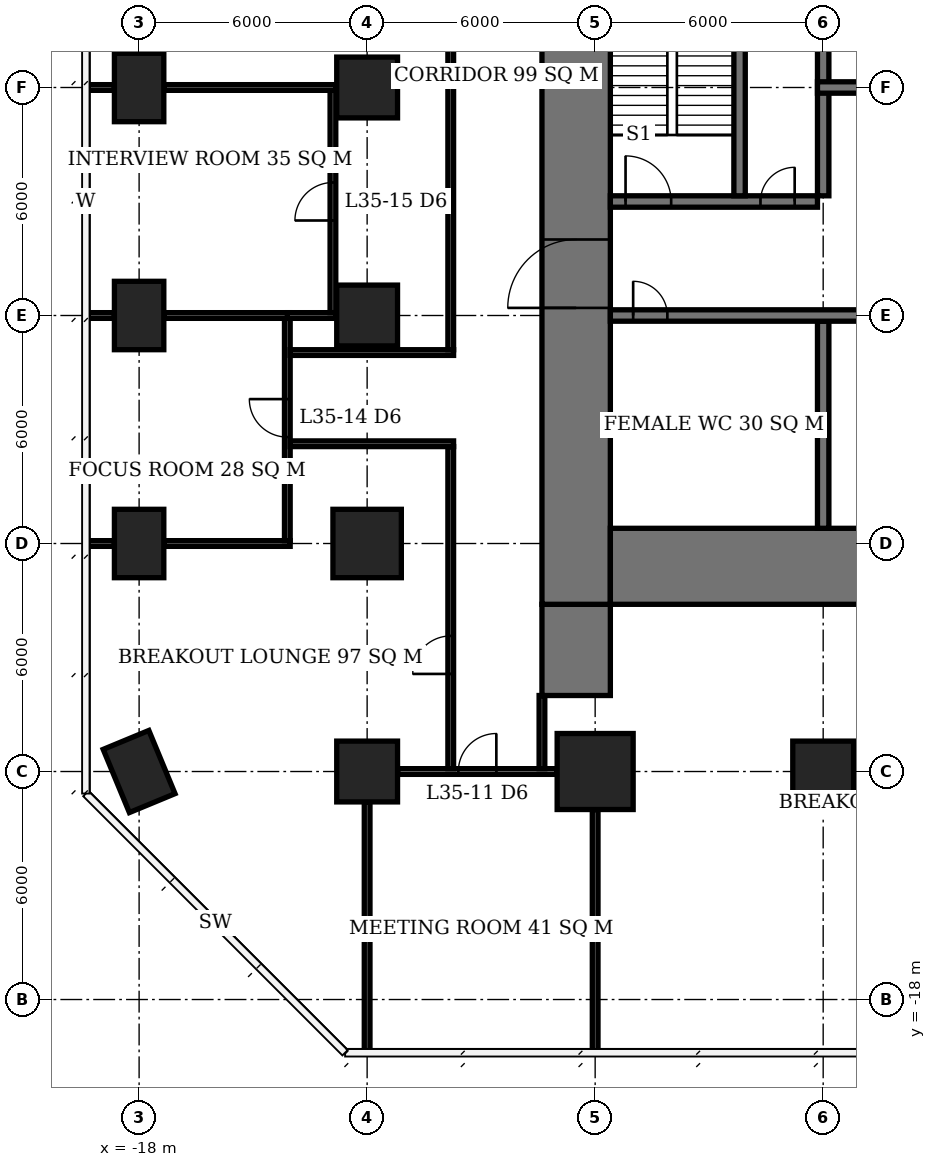
"""IFC4 building model, lengths in metres.
Left out: names, types, materials, properties, quantities, classifications, styles, units other than length and angle.
Written with IfcOpenShell. Run it as: python <this file> out.ifc"""

import sys

from ifc_helpers import new_model, si_unit, direction, frame, frame_2d, origin, origin_2d, place, context, subcontext, project, spatial, rectangle, extrude, element, fill, save


model = new_model("IFC4")
c1 = context("Model", 3, precision=1e-05, world=origin(), true_north=direction((0.0, 1.0)))
c2 = subcontext(c1, "Body", "Model", "MODEL_VIEW")
j1 = project(units=[si_unit("LENGTHUNIT", "METRE"), si_unit("PLANEANGLEUNIT", "RADIAN")], contexts=[c1])
p1 = place(None, origin())
s1 = spatial("IfcSite", under=j1, at=p1, CompositionType="ELEMENT")
p2 = place(p1, origin())
s2 = spatial("IfcBuilding", under=s1, at=p2, CompositionType="ELEMENT")
p3 = place(p2, frame((0.0, 0.0, 144.5)))
s3 = spatial("IfcBuildingStorey", under=s2, at=p3, CompositionType="ELEMENT", Elevation=144.5)
for number, where, z_axis, x_axis in (
    (1, (-18.0, -12.0, 0.0), (0.0, 0.0, 1.0), (-0.383, 0.924, 0.0)),
    (2, (-18.0, -6.0, 0.0), (0.0, 0.0, 1.0), (0.0, 1.0, 0.0)),
    (3, (-18.0, 0.0, 0.0), (0.0, 0.0, 1.0), (0.0, 1.0, 0.0)),
    (4, (-18.0, 6.0, 0.0), (0.0, 0.0, 1.0), (0.0, 1.0, 0.0)),
):
    element("IfcColumn", number, at=place(p3, frame(where, z_axis=z_axis, x_axis=x_axis)), inside=s3, PredefinedType="COLUMN", context=c2, shape_type="SweptSolid", body=[
        extrude(rectangle(XDim=1.8, YDim=1.3, at=origin_2d()), origin(), (0.0, 0.0, 1.0), 3.9),
    ])
p4 = place(p3, frame((-12.0, -12.0, 0.0), z_axis=(0.0, 0.0, 1.0), x_axis=(1.0, 0.0, 0.0)))
e5 = element("IfcColumn", 5, at=p4, inside=s3, PredefinedType="COLUMN", context=c2, shape_type="SweptSolid", body=[
    extrude(rectangle(XDim=1.6, YDim=1.6, at=origin_2d()), origin(), (0.0, 0.0, 1.0), 3.9),
])
p5 = place(p3, frame((-12.0, -6.0, 0.0), z_axis=(0.0, 0.0, 1.0), x_axis=(1.0, 0.0, 0.0)))
e6 = element("IfcColumn", 6, at=p5, inside=s3, PredefinedType="COLUMN", context=c2, shape_type="SweptSolid", body=[
    extrude(rectangle(XDim=1.8, YDim=1.8, at=origin_2d()), origin(), (0.0, 0.0, 1.0), 3.9),
])
for number, where, z_axis, x_axis in (
    (7, (-12.0, 0.0, 0.0), (0.0, 0.0, 1.0), (1.0, 0.0, 0.0)),
    (8, (-12.0, 6.0, 0.0), (0.0, 0.0, 1.0), (1.0, 0.0, 0.0)),
):
    element("IfcColumn", number, at=place(p3, frame(where, z_axis=z_axis, x_axis=x_axis)), inside=s3, PredefinedType="COLUMN", context=c2, shape_type="SweptSolid", body=[
        extrude(rectangle(XDim=1.6, YDim=1.6, at=origin_2d()), origin(), (0.0, 0.0, 1.0), 3.9),
    ])
p6 = place(p3, frame((-6.0, -12.0, 0.0), z_axis=(0.0, 0.0, 1.0), x_axis=(1.0, 0.0, 0.0)))
e9 = element("IfcColumn", 9, at=p6, inside=s3, PredefinedType="COLUMN", context=c2, shape_type="SweptSolid", body=[
    extrude(rectangle(XDim=2.0, YDim=2.0, at=origin_2d()), origin(), (0.0, 0.0, 1.0), 3.9),
])
p7 = place(p3, frame((0.0, -12.0, 0.0), z_axis=(0.0, 0.0, 1.0), x_axis=(1.0, 0.0, 0.0)))
e10 = element("IfcColumn", 10, at=p7, inside=s3, PredefinedType="COLUMN", context=c2, shape_type="SweptSolid", body=[
    extrude(rectangle(XDim=1.6, YDim=1.6, at=origin_2d()), origin(), (0.0, 0.0, 1.0), 3.9),
])
p8 = place(p3, frame((-5.6, -6.6, 0.0), z_axis=(0.0, 0.0, 1.0), x_axis=(1.0, 0.0, 0.0)))
e11 = element("IfcWall", 11, at=p8, inside=s3, PredefinedType="SHEAR", context=c2, shape_type="SweptSolid", body=[
    extrude(rectangle(XDim=23.2, YDim=2.0, at=frame_2d((11.6, 0.0))), origin(), (0.0, 0.0, 1.0), 3.9),
])
p9 = place(p3, frame((-6.5, -7.6, 0.0), z_axis=(0.0, 0.0, 1.0), x_axis=(0.0, 1.0, 0.0)))
e12 = element("IfcWall", 12, at=p9, inside=s3, PredefinedType="SHEAR", context=c2, shape_type="SweptSolid", body=[
    extrude(rectangle(XDim=21.2, YDim=1.8, at=frame_2d((10.6, 0.0))), origin(), (0.0, 0.0, 1.0), 3.9),
])
p10 = place(p9, frame((7.8, 0.0, 0.0)))
e13 = element("IfcOpeningElement", 13, at=p10, cuts=e12, PredefinedType="OPENING", context=c2, shape_type="SweptSolid", body=[
    extrude(rectangle(XDim=1.8, YDim=2.4, at=frame_2d((0.9, 1.2))), frame((0.0, 0.91, 0.0), z_axis=(0.0, -1.0, 0.0), x_axis=(1.0, 0.0, 0.0)), (0.0, 0.0, 1.0), 1.82),
])
p11 = place(p3, frame((-6.5, -10.0, 0.0), z_axis=(0.0, 0.0, 1.0), x_axis=(0.0, 1.0, 0.0)))
e14 = element("IfcWall", 14, at=p11, inside=s3, PredefinedType="SHEAR", context=c2, shape_type="SweptSolid", body=[
    extrude(rectangle(XDim=2.4, YDim=1.8, at=frame_2d((1.2, 0.0))), origin(), (0.0, 0.0, 1.0), 3.9),
])
p12 = place(p3, frame((-5.6, 0.0, 0.0), z_axis=(0.0, 0.0, 1.0), x_axis=(1.0, 0.0, 0.0)))
e15 = element("IfcWall", 15, at=p12, inside=s3, PredefinedType="SHEAR", context=c2, shape_type="SweptSolid", body=[
    extrude(rectangle(XDim=17.75, YDim=0.3, at=frame_2d((8.875, 0.0))), origin(), (0.0, 0.0, 1.0), 3.9),
])
p13 = place(p12, frame((0.6, 0.0, 0.0)))
e16 = element("IfcOpeningElement", 16, at=p13, cuts=e15, PredefinedType="OPENING", context=c2, shape_type="SweptSolid", body=[
    extrude(rectangle(XDim=0.9, YDim=2.1, at=frame_2d((0.45, 1.05))), frame((0.0, 0.16, 0.0), z_axis=(0.0, -1.0, 0.0), x_axis=(1.0, 0.0, 0.0)), (0.0, 0.0, 1.0), 0.32),
])
p14 = place(p12, frame((6.55, 0.0, 0.0)))
e17 = element("IfcOpeningElement", 17, at=p14, cuts=e15, PredefinedType="OPENING", context=c2, shape_type="SweptSolid", body=[
    extrude(rectangle(XDim=1.1, YDim=2.1, at=frame_2d((0.55, 1.05))), frame((0.0, 0.16, 0.0), z_axis=(0.0, -1.0, 0.0), x_axis=(1.0, 0.0, 0.0)), (0.0, 0.0, 1.0), 0.32),
])
p15 = place(p12, frame((9.55, 0.0, 0.0)))
e18 = element("IfcOpeningElement", 18, at=p15, cuts=e15, PredefinedType="OPENING", context=c2, shape_type="SweptSolid", body=[
    extrude(rectangle(XDim=1.1, YDim=2.1, at=frame_2d((0.55, 1.05))), frame((0.0, 0.16, 0.0), z_axis=(0.0, -1.0, 0.0), x_axis=(1.0, 0.0, 0.0)), (0.0, 0.0, 1.0), 0.32),
])
p16 = place(p3, frame((-5.6, 3.0, 0.0), z_axis=(0.0, 0.0, 1.0), x_axis=(1.0, 0.0, 0.0)))
e19 = element("IfcWall", 19, at=p16, inside=s3, PredefinedType="SHEAR", context=c2, shape_type="SweptSolid", body=[
    extrude(rectangle(XDim=5.45, YDim=0.3, at=frame_2d((2.725, 0.0))), origin(), (0.0, 0.0, 1.0), 3.9),
])
p17 = place(p16, frame((0.4, 0.0, 0.0)))
e20 = element("IfcOpeningElement", 20, at=p17, cuts=e19, PredefinedType="OPENING", context=c2, shape_type="SweptSolid", body=[
    extrude(rectangle(XDim=1.2, YDim=2.1, at=frame_2d((0.6, 1.05))), frame((0.0, 0.16, 0.0), z_axis=(0.0, -1.0, 0.0), x_axis=(1.0, 0.0, 0.0)), (0.0, 0.0, 1.0), 0.32),
])
p18 = place(p16, frame((3.95, 0.0, 0.0)))
e21 = element("IfcOpeningElement", 21, at=p18, cuts=e19, PredefinedType="OPENING", context=c2, shape_type="SweptSolid", body=[
    extrude(rectangle(XDim=0.9, YDim=2.1, at=frame_2d((0.45, 1.05))), frame((0.0, 0.16, 0.0), z_axis=(0.0, -1.0, 0.0), x_axis=(1.0, 0.0, 0.0)), (0.0, 0.0, 1.0), 0.32),
])
p19 = place(p3, frame((-0.15, 6.0, 0.0), z_axis=(0.0, 0.0, 1.0), x_axis=(1.0, 0.0, 0.0)))
e22 = element("IfcWall", 22, at=p19, inside=s3, PredefinedType="SHEAR", context=c2, shape_type="SweptSolid", body=[
    extrude(rectangle(XDim=17.75, YDim=0.3, at=frame_2d((8.875, 0.0))), origin(), (0.0, 0.0, 1.0), 3.9),
])
p20 = place(p19, frame((13.15, 0.0, 0.0)))
e23 = element("IfcOpeningElement", 23, at=p20, cuts=e22, PredefinedType="OPENING", context=c2, shape_type="SweptSolid", body=[
    extrude(rectangle(XDim=0.9, YDim=2.1, at=frame_2d((0.45, 1.05))), frame((0.0, 0.16, 0.0), z_axis=(0.0, -1.0, 0.0), x_axis=(1.0, 0.0, 0.0)), (0.0, 0.0, 1.0), 0.32),
])
p21 = place(p19, frame((16.25, 0.0, 0.0)))
e24 = element("IfcOpeningElement", 24, at=p21, cuts=e22, PredefinedType="OPENING", context=c2, shape_type="SweptSolid", body=[
    extrude(rectangle(XDim=1.0, YDim=2.1, at=frame_2d((0.5, 1.05))), frame((0.0, 0.16, 0.0), z_axis=(0.0, -1.0, 0.0), x_axis=(1.0, 0.0, 0.0)), (0.0, 0.0, 1.0), 0.32),
])
p22 = place(p19, frame((7.25, 0.0, 0.0)))
e25 = element("IfcOpeningElement", 25, at=p22, cuts=e22, PredefinedType="OPENING", context=c2, shape_type="SweptSolid", body=[
    extrude(rectangle(XDim=1.0, YDim=2.1, at=frame_2d((0.5, 1.05))), frame((0.0, 0.16, 0.0), z_axis=(0.0, -1.0, 0.0), x_axis=(1.0, 0.0, 0.0)), (0.0, 0.0, 1.0), 0.32),
])
p23 = place(p19, frame((1.1, 0.0, 0.0)))
e26 = element("IfcOpeningElement", 26, at=p23, cuts=e22, PredefinedType="OPENING", context=c2, shape_type="SweptSolid", body=[
    extrude(rectangle(XDim=1.1, YDim=2.1, at=frame_2d((0.55, 1.05))), frame((0.0, 0.16, 0.0), z_axis=(0.0, -1.0, 0.0), x_axis=(1.0, 0.0, 0.0)), (0.0, 0.0, 1.0), 0.32),
])
p24 = place(p19, frame((4.1, 0.0, 0.0)))
e27 = element("IfcOpeningElement", 27, at=p24, cuts=e22, PredefinedType="OPENING", context=c2, shape_type="SweptSolid", body=[
    extrude(rectangle(XDim=1.1, YDim=2.1, at=frame_2d((0.55, 1.05))), frame((0.0, 0.16, 0.0), z_axis=(0.0, -1.0, 0.0), x_axis=(1.0, 0.0, 0.0)), (0.0, 0.0, 1.0), 0.32),
])
p25 = place(p3, frame((0.0, -5.6, 0.0), z_axis=(0.0, 0.0, 1.0), x_axis=(0.0, 1.0, 0.0)))
e28 = element("IfcWall", 28, at=p25, inside=s3, PredefinedType="SHEAR", context=c2, shape_type="SweptSolid", body=[
    extrude(rectangle(XDim=5.45, YDim=0.3, at=frame_2d((2.725, 0.0))), origin(), (0.0, 0.0, 1.0), 3.9),
])
for number, where, z_axis, x_axis in (
    (29, (0.0, 3.15, 0.0), (0.0, 0.0, 1.0), (0.0, 1.0, 0.0)),
    (30, (-2.2, 3.15, 0.0), (0.0, 0.0, 1.0), (0.0, 1.0, 0.0)),
):
    element("IfcWall", number, at=place(p3, frame(where, z_axis=z_axis, x_axis=x_axis)), inside=s3, PredefinedType="SHEAR", context=c2, shape_type="SweptSolid", body=[
        extrude(rectangle(XDim=8.45, YDim=0.3, at=frame_2d((4.225, 0.0))), origin(), (0.0, 0.0, 1.0), 3.9),
    ])
p26 = place(p3, frame((-11.2, -12.0, 0.0), z_axis=(0.0, 0.0, 1.0), x_axis=(1.0, 0.0, 0.0)))
e31 = element("IfcWall", 31, at=p26, inside=s3, PredefinedType="PARTITIONING", context=c2, shape_type="SweptSolid", body=[
    extrude(rectangle(XDim=4.2, YDim=0.15, at=frame_2d((2.1, 0.0))), origin(), (0.0, 0.0, 1.0), 3.65),
])
p27 = place(p26, frame((1.6, 0.0, 0.0)))
e32 = element("IfcOpeningElement", 32, at=p27, cuts=e31, PredefinedType="OPENING", context=c2, shape_type="SweptSolid", body=[
    extrude(rectangle(XDim=1.0, YDim=2.1, at=frame_2d((0.5, 1.05))), frame((0.0, 0.085, 0.0), z_axis=(0.0, -1.0, 0.0), x_axis=(1.0, 0.0, 0.0)), (0.0, 0.0, 1.0), 0.17),
])
p28 = place(p3, frame((-19.4, -6.0, 0.0), z_axis=(0.0, 0.0, 1.0), x_axis=(1.0, 0.0, 0.0)))
e33 = element("IfcWall", 33, at=p28, inside=s3, PredefinedType="PARTITIONING", context=c2, shape_type="SweptSolid", body=[
    extrude(rectangle(XDim=0.75, YDim=0.15, at=frame_2d((0.375, 0.0))), origin(), (0.0, 0.0, 1.0), 3.65),
])
p29 = place(p3, frame((-17.35, -6.0, 0.0), z_axis=(0.0, 0.0, 1.0), x_axis=(1.0, 0.0, 0.0)))
e34 = element("IfcWall", 34, at=p29, inside=s3, PredefinedType="PARTITIONING", context=c2, shape_type="SweptSolid", body=[
    extrude(rectangle(XDim=3.325, YDim=0.15, at=frame_2d((1.663, 0.0))), origin(), (0.0, 0.0, 1.0), 3.65),
])
p30 = place(p3, frame((-19.35, 0.0, 0.0), z_axis=(0.0, 0.0, 1.0), x_axis=(1.0, 0.0, 0.0)))
e35 = element("IfcWall", 35, at=p30, inside=s3, PredefinedType="PARTITIONING", context=c2, shape_type="SweptSolid", body=[
    extrude(rectangle(XDim=0.7, YDim=0.15, at=frame_2d((0.35, 0.0))), origin(), (0.0, 0.0, 1.0), 3.65),
])
p31 = place(p3, frame((-17.35, 0.0, 0.0), z_axis=(0.0, 0.0, 1.0), x_axis=(1.0, 0.0, 0.0)))
e36 = element("IfcWall", 36, at=p31, inside=s3, PredefinedType="PARTITIONING", context=c2, shape_type="SweptSolid", body=[
    extrude(rectangle(XDim=3.325, YDim=0.15, at=frame_2d((1.663, 0.0))), origin(), (0.0, 0.0, 1.0), 3.65),
])
p32 = place(p3, frame((-14.1, 0.0, 0.0), z_axis=(0.0, 0.0, 1.0), x_axis=(1.0, 0.0, 0.0)))
e37 = element("IfcWall", 37, at=p32, inside=s3, PredefinedType="PARTITIONING", context=c2, shape_type="SweptSolid", body=[
    extrude(rectangle(XDim=1.275, YDim=0.15, at=frame_2d((0.638, 0.0))), origin(), (0.0, 0.0, 1.0), 3.65),
])
p33 = place(p3, frame((-19.35, 6.0, 0.0), z_axis=(0.0, 0.0, 1.0), x_axis=(1.0, 0.0, 0.0)))
e38 = element("IfcWall", 38, at=p33, inside=s3, PredefinedType="PARTITIONING", context=c2, shape_type="SweptSolid", body=[
    extrude(rectangle(XDim=0.7, YDim=0.15, at=frame_2d((0.35, 0.0))), origin(), (0.0, 0.0, 1.0), 3.65),
])
p34 = place(p3, frame((-17.35, 6.0, 0.0), z_axis=(0.0, 0.0, 1.0), x_axis=(1.0, 0.0, 0.0)))
e39 = element("IfcWall", 39, at=p34, inside=s3, PredefinedType="PARTITIONING", context=c2, shape_type="SweptSolid", body=[
    extrude(rectangle(XDim=4.525, YDim=0.15, at=frame_2d((2.263, 0.0))), origin(), (0.0, 0.0, 1.0), 3.65),
])
p35 = place(p3, frame((-14.1, -5.925, 0.0), z_axis=(0.0, 0.0, 1.0), x_axis=(0.0, 1.0, 0.0)))
e40 = element("IfcWall", 40, at=p35, inside=s3, PredefinedType="PARTITIONING", context=c2, shape_type="SweptSolid", body=[
    extrude(rectangle(XDim=5.85, YDim=0.15, at=frame_2d((2.925, 0.0))), origin(), (0.0, 0.0, 1.0), 3.65),
])
p36 = place(p35, frame((2.725, 0.0, 0.0)))
e41 = element("IfcOpeningElement", 41, at=p36, cuts=e40, PredefinedType="OPENING", context=c2, shape_type="SweptSolid", body=[
    extrude(rectangle(XDim=1.0, YDim=2.1, at=frame_2d((0.5, 1.05))), frame((0.0, 0.085, 0.0), z_axis=(0.0, -1.0, 0.0), x_axis=(1.0, 0.0, 0.0)), (0.0, 0.0, 1.0), 0.17),
])
p37 = place(p3, frame((-12.9, 0.075, 0.0), z_axis=(0.0, 0.0, 1.0), x_axis=(0.0, 1.0, 0.0)))
e42 = element("IfcWall", 42, at=p37, inside=s3, PredefinedType="PARTITIONING", context=c2, shape_type="SweptSolid", body=[
    extrude(rectangle(XDim=5.85, YDim=0.15, at=frame_2d((2.925, 0.0))), origin(), (0.0, 0.0, 1.0), 3.65),
])
p38 = place(p37, frame((2.425, 0.0, 0.0)))
e43 = element("IfcOpeningElement", 43, at=p38, cuts=e42, PredefinedType="OPENING", context=c2, shape_type="SweptSolid", body=[
    extrude(rectangle(XDim=1.0, YDim=2.1, at=frame_2d((0.5, 1.05))), frame((0.0, 0.085, 0.0), z_axis=(0.0, -1.0, 0.0), x_axis=(1.0, 0.0, 0.0)), (0.0, 0.0, 1.0), 0.17),
])
p39 = place(p3, frame((-12.0, -19.4, 0.0), z_axis=(0.0, 0.0, 1.0), x_axis=(0.0, 1.0, 0.0)))
e44 = element("IfcWall", 44, at=p39, inside=s3, PredefinedType="PARTITIONING", context=c2, shape_type="SweptSolid", body=[
    extrude(rectangle(XDim=3.09, YDim=0.15, at=frame_2d((1.545, 0.0))), origin(), (0.0, 0.0, 1.0), 3.65),
])
p40 = place(p3, frame((-12.0, -16.31, 0.0), z_axis=(0.0, 0.0, 1.0), x_axis=(0.0, 1.0, 0.0)))
e45 = element("IfcWall", 45, at=p40, inside=s3, PredefinedType="PARTITIONING", context=c2, shape_type="SweptSolid", body=[
    extrude(rectangle(XDim=3.51, YDim=0.15, at=frame_2d((1.755, 0.0))), origin(), (0.0, 0.0, 1.0), 2.65),
])
p41 = place(p3, frame((-6.0, -19.4, 0.0), z_axis=(0.0, 0.0, 1.0), x_axis=(0.0, 1.0, 0.0)))
e46 = element("IfcWall", 46, at=p41, inside=s3, PredefinedType="PARTITIONING", context=c2, shape_type="SweptSolid", body=[
    extrude(rectangle(XDim=3.09, YDim=0.15, at=frame_2d((1.545, 0.0))), origin(), (0.0, 0.0, 1.0), 3.65),
])
p42 = place(p3, frame((-6.0, -16.31, 0.0), z_axis=(0.0, 0.0, 1.0), x_axis=(0.0, 1.0, 0.0)))
e47 = element("IfcWall", 47, at=p42, inside=s3, PredefinedType="PARTITIONING", context=c2, shape_type="SweptSolid", body=[
    extrude(rectangle(XDim=3.31, YDim=0.15, at=frame_2d((1.655, 0.0))), origin(), (0.0, 0.0, 1.0), 2.65),
])
for number, where, z_axis, x_axis in (
    (48, (-14.025, -3.375, 0.0), (0.0, 0.0, 1.0), (1.0, 0.0, 0.0)),
    (49, (-14.025, -0.975, 0.0), (0.0, 0.0, 1.0), (1.0, 0.0, 0.0)),
):
    element("IfcWall", number, at=place(p3, frame(where, z_axis=z_axis, x_axis=x_axis)), inside=s3, PredefinedType="PARTITIONING", context=c2, shape_type="SweptSolid", body=[
        extrude(rectangle(XDim=4.3, YDim=0.15, at=frame_2d((2.15, 0.0))), origin(), (0.0, 0.0, 1.0), 3.65),
    ])
p43 = place(p3, frame((-9.8, -11.925, 0.0), z_axis=(0.0, 0.0, 1.0), x_axis=(0.0, 1.0, 0.0)))
e50 = element("IfcWall", 50, at=p43, inside=s3, PredefinedType="PARTITIONING", context=c2, shape_type="SweptSolid", body=[
    extrude(rectangle(XDim=8.475, YDim=0.15, at=frame_2d((4.238, 0.0))), origin(), (0.0, 0.0, 1.0), 3.65),
])
p44 = place(p43, frame((2.493, 0.0, 0.0)))
e51 = element("IfcOpeningElement", 51, at=p44, cuts=e50, PredefinedType="OPENING", context=c2, shape_type="SweptSolid", body=[
    extrude(rectangle(XDim=1.0, YDim=2.1, at=frame_2d((0.5, 1.05))), frame((0.0, 0.085, 0.0), z_axis=(0.0, -1.0, 0.0), x_axis=(1.0, 0.0, 0.0)), (0.0, 0.0, 1.0), 0.17),
])
p45 = place(p3, frame((-9.8, -0.9, 0.0), z_axis=(0.0, 0.0, 1.0), x_axis=(0.0, 1.0, 0.0)))
e52 = element("IfcWall", 52, at=p45, inside=s3, PredefinedType="PARTITIONING", context=c2, shape_type="SweptSolid", body=[
    extrude(rectangle(XDim=26.3, YDim=0.15, at=frame_2d((13.15, 0.0))), origin(), (0.0, 0.0, 1.0), 3.65),
])
p46 = place(p45, frame((8.621, 0.0, 0.0)))
e53 = element("IfcOpeningElement", 53, at=p46, cuts=e52, PredefinedType="OPENING", context=c2, shape_type="SweptSolid", body=[
    extrude(rectangle(XDim=1.0, YDim=2.1, at=frame_2d((0.5, 1.05))), frame((0.0, 0.085, 0.0), z_axis=(0.0, -1.0, 0.0), x_axis=(1.0, 0.0, 0.0)), (0.0, 0.0, 1.0), 0.17),
])
p47 = place(p3, frame((-7.4, -11.925, 0.0), z_axis=(0.0, 0.0, 1.0), x_axis=(0.0, 1.0, 0.0)))
e54 = element("IfcWall", 54, at=p47, inside=s3, PredefinedType="PARTITIONING", context=c2, shape_type="SweptSolid", body=[
    extrude(rectangle(XDim=1.925, YDim=0.15, at=frame_2d((0.962, 0.0))), origin(), (0.0, 0.0, 1.0), 3.65),
])
p48 = place(p10, origin())
e55 = element("IfcDoor", 55, at=p48, inside=s3, OperationType="DOUBLE_DOOR_SINGLE_SWING", PredefinedType="DOOR", context=c2, shape_type="SweptSolid", body=[
    extrude(rectangle(XDim=1.8, YDim=2.4, at=frame_2d((0.9, 1.2))), frame((0.0, 0.025, 0.0), z_axis=(0.0, -1.0, 0.0), x_axis=(1.0, 0.0, 0.0)), (0.0, 0.0, 1.0), 0.05),
])
fill(e13, e55)
p49 = place(p17, origin())
e56 = element("IfcDoor", 56, at=p49, inside=s3, OperationType="SINGLE_SWING_LEFT", PredefinedType="DOOR", context=c2, shape_type="SweptSolid", body=[
    extrude(rectangle(XDim=1.2, YDim=2.1, at=frame_2d((0.6, 1.05))), frame((0.0, 0.025, 0.0), z_axis=(0.0, -1.0, 0.0), x_axis=(1.0, 0.0, 0.0)), (0.0, 0.0, 1.0), 0.05),
])
fill(e20, e56)
p50 = place(p18, origin())
e57 = element("IfcDoor", 57, at=p50, inside=s3, OperationType="SINGLE_SWING_RIGHT", PredefinedType="DOOR", context=c2, shape_type="SweptSolid", body=[
    extrude(rectangle(XDim=0.9, YDim=2.1, at=frame_2d((0.45, 1.05))), frame((0.0, 0.025, 0.0), z_axis=(0.0, -1.0, 0.0), x_axis=(1.0, 0.0, 0.0)), (0.0, 0.0, 1.0), 0.05),
])
fill(e21, e57)
p51 = place(p13, origin())
e58 = element("IfcDoor", 58, at=p51, inside=s3, OperationType="SINGLE_SWING_LEFT", PredefinedType="DOOR", context=c2, shape_type="SweptSolid", body=[
    extrude(rectangle(XDim=0.9, YDim=2.1, at=frame_2d((0.45, 1.05))), frame((0.0, 0.025, 0.0), z_axis=(0.0, -1.0, 0.0), x_axis=(1.0, 0.0, 0.0)), (0.0, 0.0, 1.0), 0.05),
])
fill(e16, e58)
p52 = place(p27, origin())
e59 = element("IfcDoor", 59, at=p52, inside=s3, OperationType="SINGLE_SWING_RIGHT", PredefinedType="DOOR", context=c2, shape_type="SweptSolid", body=[
    extrude(rectangle(XDim=1.0, YDim=2.1, at=frame_2d((0.5, 1.05))), frame((0.0, 0.025, 0.0), z_axis=(0.0, -1.0, 0.0), x_axis=(1.0, 0.0, 0.0)), (0.0, 0.0, 1.0), 0.05),
])
fill(e32, e59)
p53 = place(p36, origin())
e60 = element("IfcDoor", 60, at=p53, inside=s3, OperationType="SINGLE_SWING_RIGHT", PredefinedType="DOOR", context=c2, shape_type="SweptSolid", body=[
    extrude(rectangle(XDim=1.0, YDim=2.1, at=frame_2d((0.5, 1.05))), frame((0.0, 0.025, 0.0), z_axis=(0.0, -1.0, 0.0), x_axis=(1.0, 0.0, 0.0)), (0.0, 0.0, 1.0), 0.05),
])
fill(e41, e60)
p54 = place(p38, origin())
e61 = element("IfcDoor", 61, at=p54, inside=s3, OperationType="SINGLE_SWING_LEFT", PredefinedType="DOOR", context=c2, shape_type="SweptSolid", body=[
    extrude(rectangle(XDim=1.0, YDim=2.1, at=frame_2d((0.5, 1.05))), frame((0.0, 0.025, 0.0), z_axis=(0.0, -1.0, 0.0), x_axis=(1.0, 0.0, 0.0)), (0.0, 0.0, 1.0), 0.05),
])
fill(e43, e61)
p55 = place(p44, origin())
e62 = element("IfcDoor", 62, at=p55, inside=s3, OperationType="SINGLE_SWING_LEFT", PredefinedType="DOOR", context=c2, shape_type="SweptSolid", body=[
    extrude(rectangle(XDim=1.0, YDim=2.1, at=frame_2d((0.5, 1.05))), frame((0.0, 0.025, 0.0), z_axis=(0.0, -1.0, 0.0), x_axis=(1.0, 0.0, 0.0)), (0.0, 0.0, 1.0), 0.05),
])
fill(e51, e62)
save(model, sys.argv[1])
